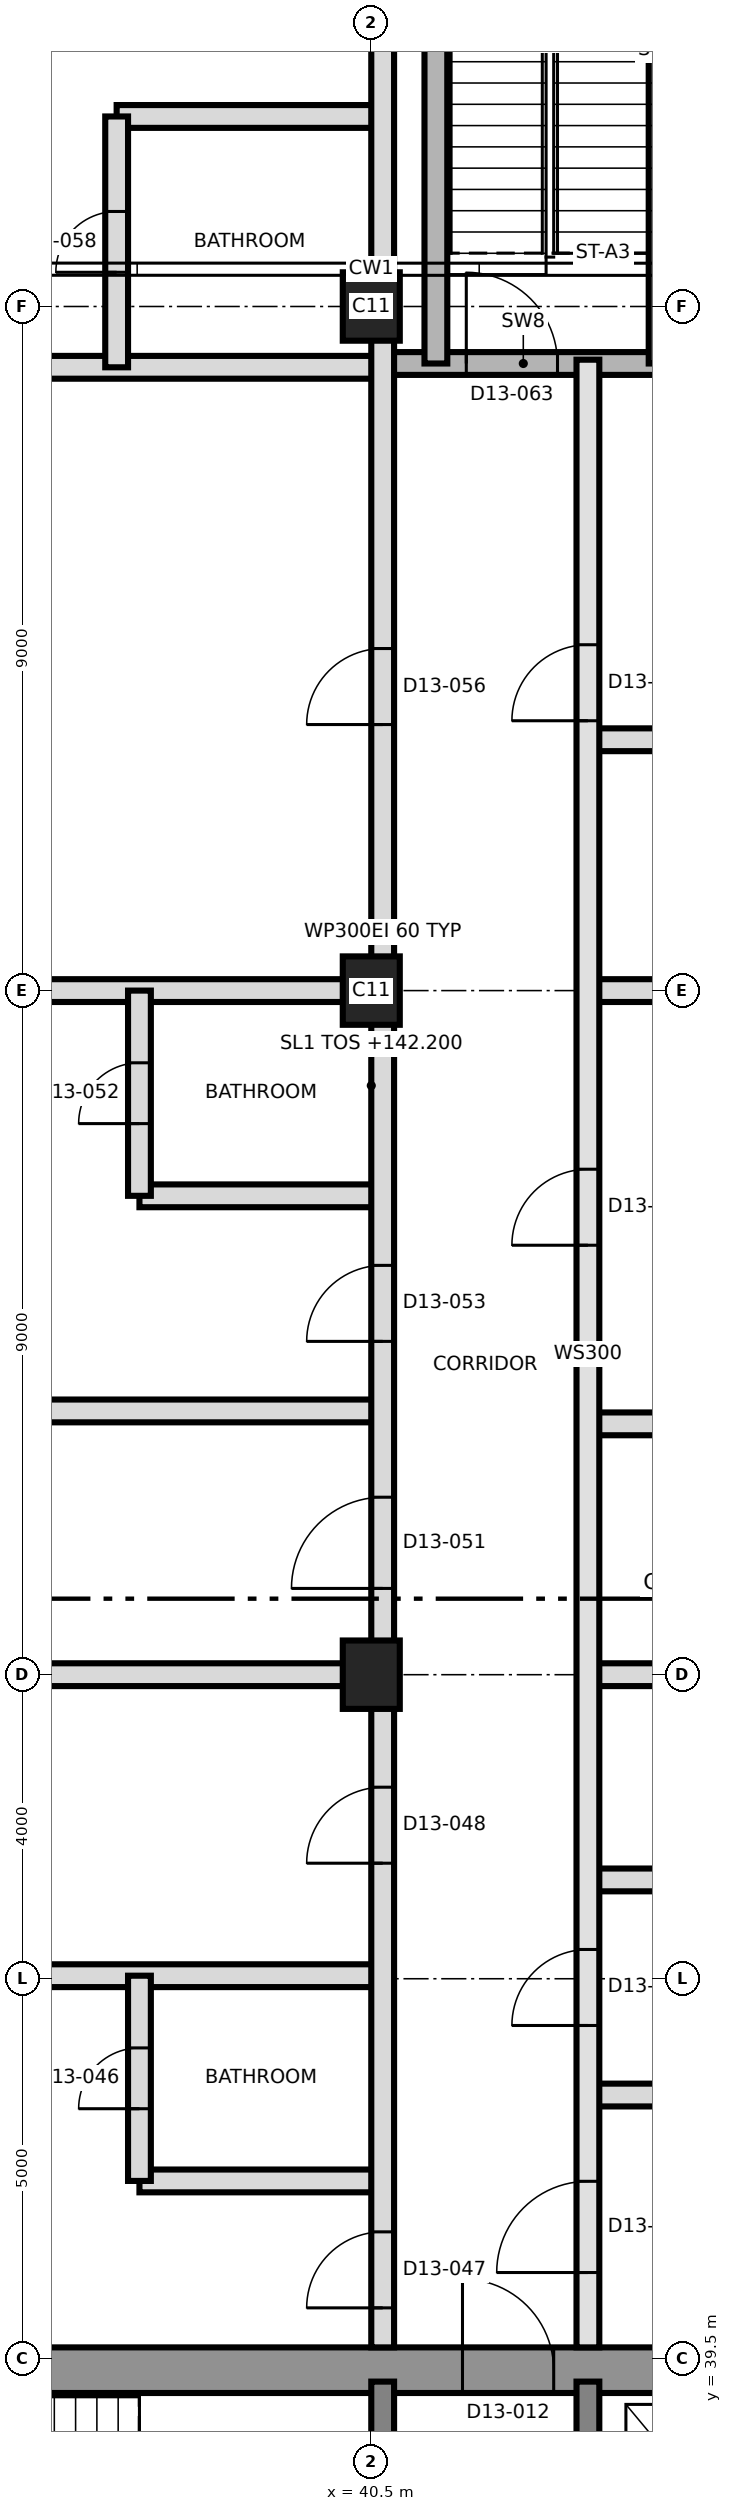
"""IFC4 building model, lengths in metres.
Left out: names, types, materials, properties, quantities, classifications, styles, units other than length and angle.
Written with IfcOpenShell. Run it as: python <this file> out.ifc"""

import sys

from ifc_helpers import new_model, si_unit, direction, frame, frame_2d, origin, origin_2d, place, context, subcontext, project, spatial, rectangle, extrude, element, fill, save


model = new_model("IFC4")
c1 = context("Model", 3, precision=1e-05, world=origin(), true_north=direction((0.0, 1.0)))
c2 = subcontext(c1, "Body", "Model", "MODEL_VIEW")
j1 = project(units=[si_unit("LENGTHUNIT", "METRE"), si_unit("PLANEANGLEUNIT", "RADIAN")], contexts=[c1])
p1 = place(None, origin())
s1 = spatial("IfcSite", under=j1, at=p1, CompositionType="ELEMENT")
p2 = place(p1, origin())
s2 = spatial("IfcBuilding", under=s1, at=p2, CompositionType="ELEMENT")
p3 = place(p2, frame((0.0, 0.0, 142.2)))
s3 = spatial("IfcBuildingStorey", under=s2, at=p3, CompositionType="ELEMENT", Elevation=142.2)
p4 = place(p3, frame((31.2, 39.35, 0.0), z_axis=(0.0, 0.0, 1.0), x_axis=(1.0, 0.0, 0.0)))
e1 = element("IfcWall", 1, at=p4, inside=s3, PredefinedType="SHEAR", context=c2, shape_type="SweptSolid", body=[
    extrude(rectangle(XDim=27.0, YDim=0.6, at=frame_2d((13.5, 0.0))), origin(), (0.0, 0.0, 1.0), 3.7),
])
p5 = place(p4, frame((10.5, 0.0, 0.0)))
e2 = element("IfcOpeningElement", 2, at=p5, cuts=e1, PredefinedType="OPENING", context=c2, shape_type="SweptSolid", body=[
    extrude(rectangle(XDim=1.2, YDim=2.1, at=frame_2d((0.6, 1.05))), frame((0.0, 0.31, 0.0), z_axis=(0.0, -1.0, 0.0), x_axis=(1.0, 0.0, 0.0)), (0.0, 0.0, 1.0), 0.62),
])
for number, where, z_axis, x_axis in (
    (3, (40.65, 33.5, 0.0), (0.0, 0.0, 1.0), (0.0, 1.0, 0.0)),
    (4, (43.35, 33.5, 0.0), (0.0, 0.0, 1.0), (0.0, 1.0, 0.0)),
):
    element("IfcWall", number, at=place(p3, frame(where, z_axis=z_axis, x_axis=x_axis)), inside=s3, PredefinedType="SHEAR", context=c2, shape_type="SweptSolid", body=[
        extrude(rectangle(XDim=5.7, YDim=0.3, at=frame_2d((2.85, 0.0))), origin(), (0.0, 0.0, 1.0), 3.7),
    ])
for number, where, z_axis, x_axis in (
    (5, (40.5, 48.5, 0.0), (0.0, 0.0, 1.0), (0.0, 1.0, 0.0)),
    (6, (40.5, 57.5, 0.0), (0.0, 0.0, 1.0), (0.0, 1.0, 0.0)),
    (7, (40.5, 66.5, 0.0), (0.0, 0.0, 1.0), (0.0, 1.0, 0.0)),
):
    element("IfcColumn", number, at=place(p3, frame(where, z_axis=z_axis, x_axis=x_axis)), inside=s3, PredefinedType="COLUMN", context=c2, shape_type="SweptSolid", body=[
        extrude(rectangle(XDim=0.9, YDim=0.75, at=origin_2d()), origin(), (0.0, 0.0, 1.0), 3.7),
    ])
p6 = place(p3, frame((37.45, 41.84, 0.0), z_axis=(0.0, 0.0, 1.0), x_axis=(1.0, 0.0, 0.0)))
e8 = element("IfcWall", 8, at=p6, inside=s3, PredefinedType="PARTITIONING", context=c2, shape_type="SweptSolid", body=[
    extrude(rectangle(XDim=3.2, YDim=0.3, at=frame_2d((1.6, 0.0))), origin(), (0.0, 0.0, 1.0), 3.4),
])
p7 = place(p3, frame((43.35, 42.97, 0.0), z_axis=(0.0, 0.0, 1.0), x_axis=(1.0, 0.0, 0.0)))
e9 = element("IfcWall", 9, at=p7, inside=s3, PredefinedType="PARTITIONING", context=c2, shape_type="SweptSolid", body=[
    extrude(rectangle(XDim=8.402, YDim=0.3, at=frame_2d((4.201, 0.0))), origin(), (0.0, 0.0, 1.0), 3.4),
])
p8 = place(p3, frame((30.35, 44.54, 0.0), z_axis=(0.0, 0.0, 1.0), x_axis=(1.0, 0.0, 0.0)))
e10 = element("IfcWall", 10, at=p8, inside=s3, PredefinedType="PARTITIONING", context=c2, shape_type="SweptSolid", body=[
    extrude(rectangle(XDim=10.3, YDim=0.3, at=frame_2d((5.15, 0.0))), origin(), (0.0, 0.0, 1.0), 3.4),
])
p9 = place(p3, frame((43.35, 45.8, 0.0), z_axis=(0.0, 0.0, 1.0), x_axis=(1.0, 0.0, 0.0)))
e11 = element("IfcWall", 11, at=p9, inside=s3, PredefinedType="PARTITIONING", context=c2, shape_type="SweptSolid", body=[
    extrude(rectangle(XDim=3.2, YDim=0.3, at=frame_2d((1.6, 0.0))), origin(), (0.0, 0.0, 1.0), 3.4),
])
p10 = place(p3, frame((30.35, 48.5, 0.0), z_axis=(0.0, 0.0, 1.0), x_axis=(1.0, 0.0, 0.0)))
e12 = element("IfcWall", 12, at=p10, inside=s3, PredefinedType="PARTITIONING", context=c2, shape_type="SweptSolid", body=[
    extrude(rectangle(XDim=10.3, YDim=0.3, at=frame_2d((5.15, 0.0))), origin(), (0.0, 0.0, 1.0), 3.4),
])
p11 = place(p3, frame((43.35, 48.5, 0.0), z_axis=(0.0, 0.0, 1.0), x_axis=(1.0, 0.0, 0.0)))
e13 = element("IfcWall", 13, at=p11, inside=s3, PredefinedType="PARTITIONING", context=c2, shape_type="SweptSolid", body=[
    extrude(rectangle(XDim=7.48, YDim=0.3, at=frame_2d((3.74, 0.0))), origin(), (0.0, 0.0, 1.0), 3.4),
])
p12 = place(p3, frame((43.35, 51.8, 0.0), z_axis=(0.0, 0.0, 1.0), x_axis=(1.0, 0.0, 0.0)))
e14 = element("IfcWall", 14, at=p12, inside=s3, PredefinedType="PARTITIONING", context=c2, shape_type="SweptSolid", body=[
    extrude(rectangle(XDim=3.5, YDim=0.3, at=frame_2d((1.75, 0.0))), origin(), (0.0, 0.0, 1.0), 3.4),
])
p13 = place(p3, frame((30.35, 51.97, 0.0), z_axis=(0.0, 0.0, 1.0), x_axis=(1.0, 0.0, 0.0)))
e15 = element("IfcWall", 15, at=p13, inside=s3, PredefinedType="PARTITIONING", context=c2, shape_type="SweptSolid", body=[
    extrude(rectangle(XDim=10.3, YDim=0.3, at=frame_2d((5.15, 0.0))), origin(), (0.0, 0.0, 1.0), 3.4),
])
p14 = place(p3, frame((37.45, 54.8, 0.0), z_axis=(0.0, 0.0, 1.0), x_axis=(1.0, 0.0, 0.0)))
e16 = element("IfcWall", 16, at=p14, inside=s3, PredefinedType="PARTITIONING", context=c2, shape_type="SweptSolid", body=[
    extrude(rectangle(XDim=3.2, YDim=0.3, at=frame_2d((1.6, 0.0))), origin(), (0.0, 0.0, 1.0), 3.4),
])
p15 = place(p3, frame((30.35, 57.5, 0.0), z_axis=(0.0, 0.0, 1.0), x_axis=(1.0, 0.0, 0.0)))
e17 = element("IfcWall", 17, at=p15, inside=s3, PredefinedType="PARTITIONING", context=c2, shape_type="SweptSolid", body=[
    extrude(rectangle(XDim=10.3, YDim=0.3, at=frame_2d((5.15, 0.0))), origin(), (0.0, 0.0, 1.0), 3.4),
])
p16 = place(p3, frame((43.35, 57.5, 0.0), z_axis=(0.0, 0.0, 1.0), x_axis=(1.0, 0.0, 0.0)))
e18 = element("IfcWall", 18, at=p16, inside=s3, PredefinedType="PARTITIONING", context=c2, shape_type="SweptSolid", body=[
    extrude(rectangle(XDim=7.48, YDim=0.3, at=frame_2d((3.74, 0.0))), origin(), (0.0, 0.0, 1.0), 3.4),
])
p17 = place(p3, frame((43.35, 60.8, 0.0), z_axis=(0.0, 0.0, 1.0), x_axis=(1.0, 0.0, 0.0)))
e19 = element("IfcWall", 19, at=p17, inside=s3, PredefinedType="PARTITIONING", context=c2, shape_type="SweptSolid", body=[
    extrude(rectangle(XDim=3.5, YDim=0.3, at=frame_2d((1.75, 0.0))), origin(), (0.0, 0.0, 1.0), 3.4),
])
p18 = place(p3, frame((30.35, 65.7, 0.0), z_axis=(0.0, 0.0, 1.0), x_axis=(1.0, 0.0, 0.0)))
e20 = element("IfcWall", 20, at=p18, inside=s3, PredefinedType="PARTITIONING", context=c2, shape_type="SweptSolid", body=[
    extrude(rectangle(XDim=10.3, YDim=0.3, at=frame_2d((5.15, 0.0))), origin(), (0.0, 0.0, 1.0), 3.4),
])
p19 = place(p18, frame((4.65, 0.0, 0.0)))
e21 = element("IfcOpeningElement", 21, at=p19, cuts=e20, PredefinedType="OPENING", context=c2, shape_type="SweptSolid", body=[
    extrude(rectangle(XDim=1.0, YDim=2.1, at=frame_2d((0.5, 1.05))), frame((0.0, 0.16, 0.0), z_axis=(0.0, -1.0, 0.0), x_axis=(1.0, 0.0, 0.0)), (0.0, 0.0, 1.0), 0.32),
])
p20 = place(p3, frame((40.65, 65.75, 0.0), z_axis=(0.0, 0.0, 1.0), x_axis=(1.0, 0.0, 0.0)))
e22 = element("IfcWall", 22, at=p20, inside=s3, PredefinedType="SHEAR", context=c2, shape_type="SweptSolid", body=[
    extrude(rectangle(XDim=3.7, YDim=0.3, at=frame_2d((1.85, 0.0))), origin(), (0.0, 0.0, 1.0), 3.4),
])
p21 = place(p20, frame((1.1, 0.0, 0.0)))
e23 = element("IfcOpeningElement", 23, at=p21, cuts=e22, PredefinedType="OPENING", context=c2, shape_type="SweptSolid", body=[
    extrude(rectangle(XDim=1.2, YDim=2.1, at=frame_2d((0.6, 1.05))), frame((0.0, 0.16, 0.0), z_axis=(0.0, -1.0, 0.0), x_axis=(1.0, 0.0, 0.0)), (0.0, 0.0, 1.0), 0.32),
])
p22 = place(p3, frame((37.15, 69.0, 0.0), z_axis=(0.0, 0.0, 1.0), x_axis=(1.0, 0.0, 0.0)))
e24 = element("IfcWall", 24, at=p22, inside=s3, PredefinedType="PARTITIONING", context=c2, shape_type="SweptSolid", body=[
    extrude(rectangle(XDim=3.5, YDim=0.3, at=frame_2d((1.75, 0.0))), origin(), (0.0, 0.0, 1.0), 3.4),
])
p23 = place(p3, frame((37.15, 65.7, 0.0), z_axis=(0.0, 0.0, 1.0), x_axis=(0.0, 1.0, 0.0)))
e25 = element("IfcWall", 25, at=p23, inside=s3, PredefinedType="PARTITIONING", context=c2, shape_type="SweptSolid", body=[
    extrude(rectangle(XDim=3.3, YDim=0.3, at=frame_2d((1.65, 0.0))), origin(), (0.0, 0.0, 1.0), 3.4),
])
p24 = place(p23, frame((1.25, 0.0, 0.0)))
e26 = element("IfcOpeningElement", 26, at=p24, cuts=e25, PredefinedType="OPENING", context=c2, shape_type="SweptSolid", body=[
    extrude(rectangle(XDim=0.8, YDim=2.1, at=frame_2d((0.4, 1.05))), frame((0.0, 0.16, 0.0), z_axis=(0.0, -1.0, 0.0), x_axis=(1.0, 0.0, 0.0)), (0.0, 0.0, 1.0), 0.32),
])
p25 = place(p3, frame((37.45, 41.84, 0.0), z_axis=(0.0, 0.0, 1.0), x_axis=(0.0, 1.0, 0.0)))
e27 = element("IfcWall", 27, at=p25, inside=s3, PredefinedType="PARTITIONING", context=c2, shape_type="SweptSolid", body=[
    extrude(rectangle(XDim=2.7, YDim=0.3, at=frame_2d((1.35, 0.0))), origin(), (0.0, 0.0, 1.0), 3.4),
])
p26 = place(p25, frame((0.95, 0.0, 0.0)))
e28 = element("IfcOpeningElement", 28, at=p26, cuts=e27, PredefinedType="OPENING", context=c2, shape_type="SweptSolid", body=[
    extrude(rectangle(XDim=0.8, YDim=2.1, at=frame_2d((0.4, 1.05))), frame((0.0, 0.16, 0.0), z_axis=(0.0, -1.0, 0.0), x_axis=(1.0, 0.0, 0.0)), (0.0, 0.0, 1.0), 0.32),
])
p27 = place(p3, frame((37.45, 54.8, 0.0), z_axis=(0.0, 0.0, 1.0), x_axis=(0.0, 1.0, 0.0)))
e29 = element("IfcWall", 29, at=p27, inside=s3, PredefinedType="PARTITIONING", context=c2, shape_type="SweptSolid", body=[
    extrude(rectangle(XDim=2.7, YDim=0.3, at=frame_2d((1.35, 0.0))), origin(), (0.0, 0.0, 1.0), 3.4),
])
p28 = place(p27, frame((0.95, 0.0, 0.0)))
e30 = element("IfcOpeningElement", 30, at=p28, cuts=e29, PredefinedType="OPENING", context=c2, shape_type="SweptSolid", body=[
    extrude(rectangle(XDim=0.8, YDim=2.1, at=frame_2d((0.4, 1.05))), frame((0.0, 0.16, 0.0), z_axis=(0.0, -1.0, 0.0), x_axis=(1.0, 0.0, 0.0)), (0.0, 0.0, 1.0), 0.32),
])
p29 = place(p3, frame((40.65, 39.65, 0.0), z_axis=(0.0, 0.0, 1.0), x_axis=(0.0, 1.0, 0.0)))
e31 = element("IfcWall", 31, at=p29, inside=s3, PredefinedType="PARTITIONING", context=c2, shape_type="SweptSolid", body=[
    extrude(rectangle(XDim=37.24, YDim=0.3, at=frame_2d((18.62, 0.0))), origin(), (0.0, 0.0, 1.0), 3.4),
])
p30 = place(p29, frame((0.52, 0.0, 0.0)))
e32 = element("IfcOpeningElement", 32, at=p30, cuts=e31, PredefinedType="OPENING", context=c2, shape_type="SweptSolid", body=[
    extrude(rectangle(XDim=1.0, YDim=2.1, at=frame_2d((0.5, 1.05))), frame((0.0, 0.16, 0.0), z_axis=(0.0, -1.0, 0.0), x_axis=(1.0, 0.0, 0.0)), (0.0, 0.0, 1.0), 0.32),
])
p31 = place(p29, frame((6.37, 0.0, 0.0)))
e33 = element("IfcOpeningElement", 33, at=p31, cuts=e31, PredefinedType="OPENING", context=c2, shape_type="SweptSolid", body=[
    extrude(rectangle(XDim=1.0, YDim=2.1, at=frame_2d((0.5, 1.05))), frame((0.0, 0.16, 0.0), z_axis=(0.0, -1.0, 0.0), x_axis=(1.0, 0.0, 0.0)), (0.0, 0.0, 1.0), 0.32),
])
p32 = place(p29, frame((9.985, 0.0, 0.0)))
e34 = element("IfcOpeningElement", 34, at=p32, cuts=e31, PredefinedType="OPENING", context=c2, shape_type="SweptSolid", body=[
    extrude(rectangle(XDim=1.2, YDim=2.1, at=frame_2d((0.6, 1.05))), frame((0.0, 0.16, 0.0), z_axis=(0.0, -1.0, 0.0), x_axis=(1.0, 0.0, 0.0)), (0.0, 0.0, 1.0), 0.32),
])
p33 = place(p29, frame((13.235, 0.0, 0.0)))
e35 = element("IfcOpeningElement", 35, at=p33, cuts=e31, PredefinedType="OPENING", context=c2, shape_type="SweptSolid", body=[
    extrude(rectangle(XDim=1.0, YDim=2.1, at=frame_2d((0.5, 1.05))), frame((0.0, 0.16, 0.0), z_axis=(0.0, -1.0, 0.0), x_axis=(1.0, 0.0, 0.0)), (0.0, 0.0, 1.0), 0.32),
])
p34 = place(p29, frame((21.35, 0.0, 0.0)))
e36 = element("IfcOpeningElement", 36, at=p34, cuts=e31, PredefinedType="OPENING", context=c2, shape_type="SweptSolid", body=[
    extrude(rectangle(XDim=1.0, YDim=2.4, at=frame_2d((0.5, 1.2))), frame((0.0, 0.16, 0.0), z_axis=(0.0, -1.0, 0.0), x_axis=(1.0, 0.0, 0.0)), (0.0, 0.0, 1.0), 0.32),
])
p35 = place(p3, frame((41.35, 65.75, 0.0), z_axis=(0.0, 0.0, 1.0), x_axis=(0.0, 1.0, 0.0)))
e37 = element("IfcWall", 37, at=p35, inside=s3, PredefinedType="SHEAR", context=c2, shape_type="SweptSolid", body=[
    extrude(rectangle(XDim=8.85, YDim=0.3, at=frame_2d((4.425, 0.0))), origin(), (0.0, 0.0, 1.0), 3.4),
])
p36 = place(p3, frame((43.35, 39.65, 0.0), z_axis=(0.0, 0.0, 1.0), x_axis=(0.0, 1.0, 0.0)))
e38 = element("IfcWall", 38, at=p36, inside=s3, PredefinedType="SOLIDWALL", context=c2, shape_type="SweptSolid", body=[
    extrude(rectangle(XDim=26.15, YDim=0.3, at=frame_2d((13.075, 0.0))), origin(), (0.0, 0.0, 1.0), 3.4),
])
p37 = place(p36, frame((0.985, 0.0, 0.0)))
e39 = element("IfcOpeningElement", 39, at=p37, cuts=e38, PredefinedType="OPENING", context=c2, shape_type="SweptSolid", body=[
    extrude(rectangle(XDim=1.2, YDim=2.1, at=frame_2d((0.6, 1.05))), frame((0.0, 0.16, 0.0), z_axis=(0.0, -1.0, 0.0), x_axis=(1.0, 0.0, 0.0)), (0.0, 0.0, 1.0), 0.32),
])
p38 = place(p36, frame((4.235, 0.0, 0.0)))
e40 = element("IfcOpeningElement", 40, at=p38, cuts=e38, PredefinedType="OPENING", context=c2, shape_type="SweptSolid", body=[
    extrude(rectangle(XDim=1.0, YDim=2.1, at=frame_2d((0.5, 1.05))), frame((0.0, 0.16, 0.0), z_axis=(0.0, -1.0, 0.0), x_axis=(1.0, 0.0, 0.0)), (0.0, 0.0, 1.0), 0.32),
])
p39 = place(p36, frame((14.5, 0.0, 0.0)))
e41 = element("IfcOpeningElement", 41, at=p39, cuts=e38, PredefinedType="OPENING", context=c2, shape_type="SweptSolid", body=[
    extrude(rectangle(XDim=1.0, YDim=2.4, at=frame_2d((0.5, 1.2))), frame((0.0, 0.16, 0.0), z_axis=(0.0, -1.0, 0.0), x_axis=(1.0, 0.0, 0.0)), (0.0, 0.0, 1.0), 0.32),
])
p40 = place(p36, frame((21.4, 0.0, 0.0)))
e42 = element("IfcOpeningElement", 42, at=p40, cuts=e38, PredefinedType="OPENING", context=c2, shape_type="SweptSolid", body=[
    extrude(rectangle(XDim=1.0, YDim=2.4, at=frame_2d((0.5, 1.2))), frame((0.0, 0.16, 0.0), z_axis=(0.0, -1.0, 0.0), x_axis=(1.0, 0.0, 0.0)), (0.0, 0.0, 1.0), 0.32),
])
p41 = place(p3, frame((44.3, 65.75, 0.0), z_axis=(0.0, 0.0, 1.0), x_axis=(0.0, 1.0, 0.0)))
e43 = element("IfcWall", 43, at=p41, inside=s3, PredefinedType="SHEAR", context=c2, shape_type="SweptSolid", body=[
    extrude(rectangle(XDim=8.85, YDim=0.3, at=frame_2d((4.425, 0.0))), origin(), (0.0, 0.0, 1.0), 3.4),
])
p42 = place(p5, origin())
e44 = element("IfcDoor", 44, at=p42, inside=s3, OperationType="SINGLE_SWING_RIGHT", PredefinedType="DOOR", context=c2, shape_type="SweptSolid", body=[
    extrude(rectangle(XDim=1.2, YDim=2.1, at=frame_2d((0.6, 1.05))), frame((0.0, 0.025, 0.0), z_axis=(0.0, -1.0, 0.0), x_axis=(1.0, 0.0, 0.0)), (0.0, 0.0, 1.0), 0.05),
])
fill(e2, e44)
p43 = place(p37, origin())
e45 = element("IfcDoor", 45, at=p43, inside=s3, OperationType="SINGLE_SWING_RIGHT", PredefinedType="DOOR", context=c2, shape_type="SweptSolid", body=[
    extrude(rectangle(XDim=1.2, YDim=2.1, at=frame_2d((0.6, 1.05))), frame((0.0, 0.025, 0.0), z_axis=(0.0, -1.0, 0.0), x_axis=(1.0, 0.0, 0.0)), (0.0, 0.0, 1.0), 0.05),
])
fill(e39, e45)
p44 = place(p38, origin())
e46 = element("IfcDoor", 46, at=p44, inside=s3, OperationType="SINGLE_SWING_LEFT", PredefinedType="DOOR", context=c2, shape_type="SweptSolid", body=[
    extrude(rectangle(XDim=1.0, YDim=2.1, at=frame_2d((0.5, 1.05))), frame((0.0, 0.025, 0.0), z_axis=(0.0, -1.0, 0.0), x_axis=(1.0, 0.0, 0.0)), (0.0, 0.0, 1.0), 0.05),
])
fill(e40, e46)
p45 = place(p26, origin())
e47 = element("IfcDoor", 47, at=p45, inside=s3, OperationType="SINGLE_SWING_LEFT", PredefinedType="DOOR", context=c2, shape_type="SweptSolid", body=[
    extrude(rectangle(XDim=0.8, YDim=2.1, at=frame_2d((0.4, 1.05))), frame((0.0, 0.025, 0.0), z_axis=(0.0, -1.0, 0.0), x_axis=(1.0, 0.0, 0.0)), (0.0, 0.0, 1.0), 0.05),
])
fill(e28, e47)
p46 = place(p30, origin())
e48 = element("IfcDoor", 48, at=p46, inside=s3, OperationType="SINGLE_SWING_RIGHT", PredefinedType="DOOR", context=c2, shape_type="SweptSolid", body=[
    extrude(rectangle(XDim=1.0, YDim=2.1, at=frame_2d((0.5, 1.05))), frame((0.0, 0.025, 0.0), z_axis=(0.0, -1.0, 0.0), x_axis=(1.0, 0.0, 0.0)), (0.0, 0.0, 1.0), 0.05),
])
fill(e32, e48)
p47 = place(p31, origin())
e49 = element("IfcDoor", 49, at=p47, inside=s3, OperationType="SINGLE_SWING_LEFT", PredefinedType="DOOR", context=c2, shape_type="SweptSolid", body=[
    extrude(rectangle(XDim=1.0, YDim=2.1, at=frame_2d((0.5, 1.05))), frame((0.0, 0.025, 0.0), z_axis=(0.0, -1.0, 0.0), x_axis=(1.0, 0.0, 0.0)), (0.0, 0.0, 1.0), 0.05),
])
fill(e33, e49)
p48 = place(p39, origin())
e50 = element("IfcDoor", 50, at=p48, inside=s3, OperationType="SINGLE_SWING_RIGHT", PredefinedType="DOOR", context=c2, shape_type="SweptSolid", body=[
    extrude(rectangle(XDim=1.0, YDim=2.4, at=frame_2d((0.5, 1.2))), frame((0.0, 0.025, 0.0), z_axis=(0.0, -1.0, 0.0), x_axis=(1.0, 0.0, 0.0)), (0.0, 0.0, 1.0), 0.05),
])
fill(e41, e50)
p49 = place(p32, origin())
e51 = element("IfcDoor", 51, at=p49, inside=s3, OperationType="SINGLE_SWING_LEFT", PredefinedType="DOOR", context=c2, shape_type="SweptSolid", body=[
    extrude(rectangle(XDim=1.2, YDim=2.1, at=frame_2d((0.6, 1.05))), frame((0.0, 0.025, 0.0), z_axis=(0.0, -1.0, 0.0), x_axis=(1.0, 0.0, 0.0)), (0.0, 0.0, 1.0), 0.05),
])
fill(e34, e51)
p50 = place(p28, origin())
e52 = element("IfcDoor", 52, at=p50, inside=s3, OperationType="SINGLE_SWING_LEFT", PredefinedType="DOOR", context=c2, shape_type="SweptSolid", body=[
    extrude(rectangle(XDim=0.8, YDim=2.1, at=frame_2d((0.4, 1.05))), frame((0.0, 0.025, 0.0), z_axis=(0.0, -1.0, 0.0), x_axis=(1.0, 0.0, 0.0)), (0.0, 0.0, 1.0), 0.05),
])
fill(e30, e52)
p51 = place(p33, origin())
e53 = element("IfcDoor", 53, at=p51, inside=s3, OperationType="SINGLE_SWING_RIGHT", PredefinedType="DOOR", context=c2, shape_type="SweptSolid", body=[
    extrude(rectangle(XDim=1.0, YDim=2.1, at=frame_2d((0.5, 1.05))), frame((0.0, 0.025, 0.0), z_axis=(0.0, -1.0, 0.0), x_axis=(1.0, 0.0, 0.0)), (0.0, 0.0, 1.0), 0.05),
])
fill(e35, e53)
p52 = place(p40, origin())
e54 = element("IfcDoor", 54, at=p52, inside=s3, OperationType="SINGLE_SWING_LEFT", PredefinedType="DOOR", context=c2, shape_type="SweptSolid", body=[
    extrude(rectangle(XDim=1.0, YDim=2.4, at=frame_2d((0.5, 1.2))), frame((0.0, 0.025, 0.0), z_axis=(0.0, -1.0, 0.0), x_axis=(1.0, 0.0, 0.0)), (0.0, 0.0, 1.0), 0.05),
])
fill(e42, e54)
p53 = place(p34, origin())
e55 = element("IfcDoor", 55, at=p53, inside=s3, OperationType="SINGLE_SWING_LEFT", PredefinedType="DOOR", context=c2, shape_type="SweptSolid", body=[
    extrude(rectangle(XDim=1.0, YDim=2.4, at=frame_2d((0.5, 1.2))), frame((0.0, 0.025, 0.0), z_axis=(0.0, -1.0, 0.0), x_axis=(1.0, 0.0, 0.0)), (0.0, 0.0, 1.0), 0.05),
])
fill(e36, e55)
p54 = place(p24, origin())
e56 = element("IfcDoor", 56, at=p54, inside=s3, OperationType="SINGLE_SWING_RIGHT", PredefinedType="DOOR", context=c2, shape_type="SweptSolid", body=[
    extrude(rectangle(XDim=0.8, YDim=2.1, at=frame_2d((0.4, 1.05))), frame((0.0, 0.025, 0.0), z_axis=(0.0, -1.0, 0.0), x_axis=(1.0, 0.0, 0.0)), (0.0, 0.0, 1.0), 0.05),
])
fill(e26, e56)
p55 = place(p21, origin())
e57 = element("IfcDoor", 57, at=p55, inside=s3, OperationType="SINGLE_SWING_RIGHT", PredefinedType="DOOR", context=c2, shape_type="SweptSolid", body=[
    extrude(rectangle(XDim=1.2, YDim=2.1, at=frame_2d((0.6, 1.05))), frame((0.0, 0.025, 0.0), z_axis=(0.0, -1.0, 0.0), x_axis=(1.0, 0.0, 0.0)), (0.0, 0.0, 1.0), 0.05),
])
fill(e23, e57)
save(model, sys.argv[1])
